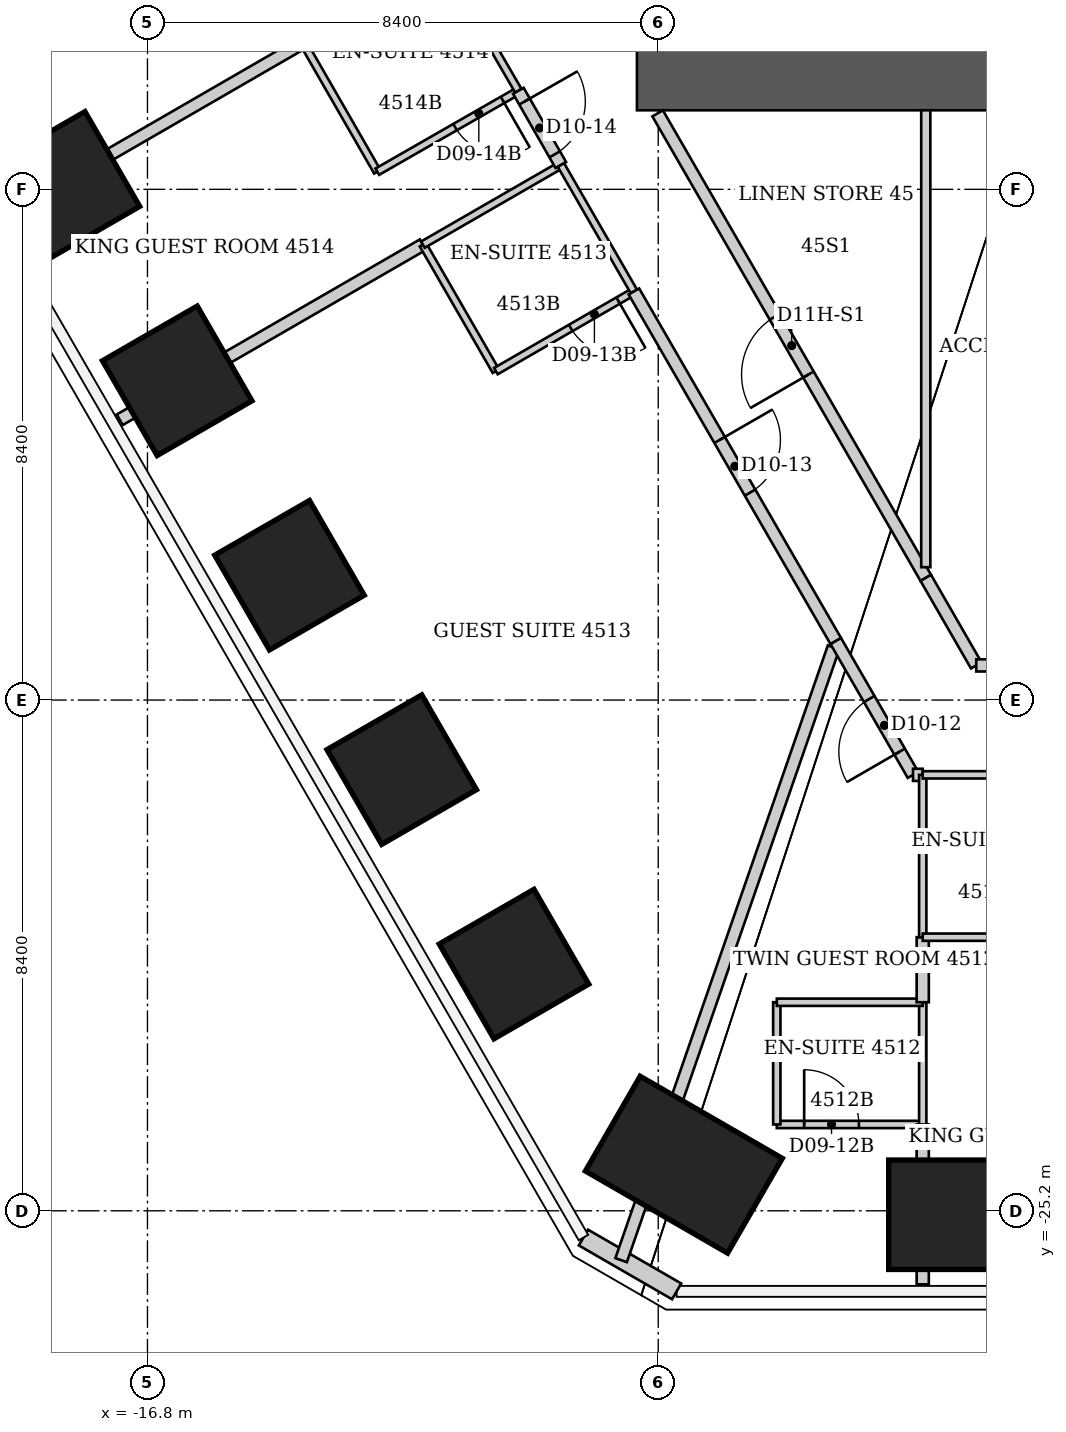
"""IFC4 building model, lengths in metres.
Left out: names, types, materials, properties, quantities, classifications, styles, units other than length and angle.
Written with IfcOpenShell. Run it as: python <this file> out.ifc"""

import sys

from ifc_helpers import new_model, si_unit, direction, frame, frame_2d, origin, origin_2d, place, context, subcontext, project, spatial, rectangle, extrude, element, fill, save


model = new_model("IFC4")
c1 = context("Model", 3, precision=1e-05, world=origin(), true_north=direction((0.0, 1.0)))
c2 = subcontext(c1, "Body", "Model", "MODEL_VIEW")
j1 = project(units=[si_unit("LENGTHUNIT", "METRE"), si_unit("PLANEANGLEUNIT", "RADIAN")], contexts=[c1])
p1 = place(None, origin())
s1 = spatial("IfcSite", under=j1, at=p1, CompositionType="ELEMENT")
p2 = place(p1, origin())
s2 = spatial("IfcBuilding", under=s1, at=p2, CompositionType="ELEMENT")
p3 = place(p2, frame((0.0, 0.0, 183.2)))
s3 = spatial("IfcBuildingStorey", under=s2, at=p3, CompositionType="ELEMENT", Elevation=183.2)
p4 = place(p3, frame((-3.71, -25.265, 0.0), z_axis=(0.0, 0.0, 1.0), x_axis=(0.0, -1.0, 0.0)))
e1 = element("IfcColumn", 1, at=p4, inside=s3, PredefinedType="COLUMN", context=c2, shape_type="SweptSolid", body=[
    extrude(rectangle(XDim=1.8, YDim=1.8, at=origin_2d()), origin(), (0.0, 0.0, 1.0), 3.8),
])
p5 = place(p3, frame((-7.979, -24.442, 0.0), z_axis=(0.0, 0.0, 1.0), x_axis=(-0.5, -0.866025403784, 0.0)))
e2 = element("IfcColumn", 2, at=p5, inside=s3, PredefinedType="COLUMN", context=c2, shape_type="SweptSolid", body=[
    extrude(rectangle(XDim=1.8, YDim=2.7, at=origin_2d()), origin(), (0.0, 0.0, 1.0), 3.8),
])
for number, where, z_axis, x_axis in (
    (3, (-10.772, -21.142, 0.0), (0.0, 0.0, 1.0), (-0.866, -0.5, 0.0)),
    (4, (-12.618, -17.945, 0.0), (0.0, 0.0, 1.0), (-0.866, -0.5, 0.0)),
    (5, (-14.465, -14.747, 0.0), (0.0, 0.0, 1.0), (-0.866, -0.5, 0.0)),
    (6, (-16.311, -11.549, 0.0), (0.0, 0.0, 1.0), (-0.866, -0.5, 0.0)),
    (7, (-18.157, -8.351, 0.0), (0.0, 0.0, 1.0), (-0.866, -0.5, 0.0)),
):
    element("IfcColumn", number, at=place(p3, frame(where, z_axis=z_axis, x_axis=x_axis)), inside=s3, PredefinedType="COLUMN", context=c2, shape_type="SweptSolid", body=[
        extrude(rectangle(XDim=1.8, YDim=1.8, at=origin_2d()), origin(), (0.0, 0.0, 1.0), 3.8),
    ])
p6 = place(p3, frame((-8.75, -6.6, 0.0), z_axis=(0.0, 0.0, 1.0), x_axis=(1.0, 0.0, 0.0)))
e8 = element("IfcWall", 8, at=p6, inside=s3, PredefinedType="SHEAR", context=c2, shape_type="SweptSolid", body=[
    extrude(rectangle(XDim=17.5, YDim=1.0, at=frame_2d((8.75, 0.0))), origin(), (0.0, 0.0, 1.0), 3.8),
])
p7 = place(p3, frame((-8.097, -26.525, 0.0), z_axis=(0.0, 0.0, 1.0), x_axis=(-0.866036293601, 0.499981137809, 0.0)))
e9 = element("IfcWall", 9, at=p7, inside=s3, PredefinedType="SOLIDWALL", context=c2, shape_type="SweptSolid", body=[
    extrude(rectangle(XDim=1.77, YDim=0.3, at=frame_2d((0.885, 0.0))), origin(), (0.0, 0.0, 1.0), 3.64),
])
p8 = place(p3, frame((-19.186, -8.85, 0.0), z_axis=(0.0, 0.0, 1.0), x_axis=(0.865702137343, 0.500559496364, 0.0)))
e10 = element("IfcWall", 10, at=p8, inside=s3, PredefinedType="PARTITIONING", context=c2, shape_type="SweptSolid", body=[
    extrude(rectangle(XDim=5.713, YDim=0.2, at=frame_2d((2.857, 0.0))), origin(), (0.0, 0.0, 1.0), 3.038),
])
p9 = place(p3, frame((-17.256, -12.19, 0.0), z_axis=(0.0, 0.0, 1.0), x_axis=(0.865937714159, 0.500151852138, 0.0)))
e11 = element("IfcWall", 11, at=p9, inside=s3, PredefinedType="PARTITIONING", context=c2, shape_type="SweptSolid", body=[
    extrude(rectangle(XDim=5.758, YDim=0.2, at=frame_2d((2.879, 0.0))), origin(), (0.0, 0.0, 1.0), 3.038),
])
p10 = place(p3, frame((-14.24, -5.99, 0.0), z_axis=(0.0, 0.0, 1.0), x_axis=(0.498748634132, -0.866746675766, 0.0)))
e12 = element("IfcWall", 12, at=p10, inside=s3, PredefinedType="PARTITIONING", context=c2, shape_type="SweptSolid", body=[
    extrude(rectangle(XDim=2.446, YDim=0.12, at=frame_2d((1.223, 0.0))), origin(), (0.0, 0.0, 1.0), 3.64),
])
p11 = place(p3, frame((-13.02, -8.11, 0.0), z_axis=(0.0, 0.0, 1.0), x_axis=(0.867545659855, 0.497357545501, 0.0)))
e13 = element("IfcWall", 13, at=p11, inside=s3, PredefinedType="PARTITIONING", context=c2, shape_type="SweptSolid", body=[
    extrude(rectangle(XDim=2.674, YDim=0.12, at=frame_2d((1.337, 0.0))), origin(), (0.0, 0.0, 1.0), 3.64),
])
p12 = place(p11, frame((1.474, 0.0, 0.0)))
e14 = element("IfcOpeningElement", 14, at=p12, cuts=e13, PredefinedType="OPENING", context=c2, shape_type="SweptSolid", body=[
    extrude(rectangle(XDim=0.9, YDim=2.03, at=frame_2d((0.45, 1.015))), frame((0.0, 0.06, 0.0), z_axis=(0.0, -1.0, 0.0), x_axis=(1.0, 0.0, 0.0)), (0.0, 0.0, 1.0), 0.12),
])
p13 = place(p3, frame((-12.27, -9.31, 0.0), z_axis=(0.0, 0.0, 1.0), x_axis=(0.499737123639, -0.866177122335, 0.0)))
e15 = element("IfcWall", 15, at=p13, inside=s3, PredefinedType="PARTITIONING", context=c2, shape_type="SweptSolid", body=[
    extrude(rectangle(XDim=2.401, YDim=0.12, at=frame_2d((1.201, 0.0))), origin(), (0.0, 0.0, 1.0), 3.64),
])
p14 = place(p3, frame((-12.27, -9.31, 0.0), z_axis=(0.0, 0.0, 1.0), x_axis=(0.866114241029, 0.499846097802, 0.0)))
e16 = element("IfcWall", 16, at=p14, inside=s3, PredefinedType="PARTITIONING", context=c2, shape_type="SweptSolid", body=[
    extrude(rectangle(XDim=2.621, YDim=0.12, at=frame_2d((1.311, 0.0))), origin(), (0.0, 0.0, 1.0), 3.038),
])
p15 = place(p3, frame((-11.93, -4.66, 0.0), z_axis=(0.0, 0.0, 1.0), x_axis=(0.501813488763, -0.864975850817, 0.0)))
e17 = element("IfcWall", 17, at=p15, inside=s3, PredefinedType="PARTITIONING", context=c2, shape_type="SweptSolid", body=[
    extrude(rectangle(XDim=2.451, YDim=0.12, at=frame_2d((1.226, 0.0))), origin(), (0.0, 0.0, 1.0), 3.64),
])
p16 = place(p3, frame((-11.07, -11.39, 0.0), z_axis=(0.0, 0.0, 1.0), x_axis=(0.866154567199, 0.49977621564, 0.0)))
e18 = element("IfcWall", 18, at=p16, inside=s3, PredefinedType="PARTITIONING", context=c2, shape_type="SweptSolid", body=[
    extrude(rectangle(XDim=2.621, YDim=0.12, at=frame_2d((1.311, 0.0))), origin(), (0.0, 0.0, 1.0), 3.64),
])
p17 = place(p16, frame((1.421, 0.0, 0.0)))
e19 = element("IfcOpeningElement", 19, at=p17, cuts=e18, PredefinedType="OPENING", context=c2, shape_type="SweptSolid", body=[
    extrude(rectangle(XDim=0.9, YDim=2.03, at=frame_2d((0.45, 1.015))), frame((0.0, 0.06, 0.0), z_axis=(0.0, -1.0, 0.0), x_axis=(1.0, 0.0, 0.0)), (0.0, 0.0, 1.0), 0.12),
])
p18 = place(p3, frame((-10.7, -6.78, 0.0), z_axis=(0.0, 0.0, 1.0), x_axis=(0.49643800013, -0.868072181346, 0.0)))
e20 = element("IfcWall", 20, at=p18, inside=s3, PredefinedType="PARTITIONING", context=c2, shape_type="SweptSolid", body=[
    extrude(rectangle(XDim=1.406, YDim=0.2, at=frame_2d((0.703, 0.0))), origin(), (0.0, 0.0, 1.0), 3.64),
])
p19 = place(p18, frame((0.203, 0.0, 0.0)))
e21 = element("IfcOpeningElement", 21, at=p19, cuts=e20, PredefinedType="OPENING", context=c2, shape_type="SweptSolid", body=[
    extrude(rectangle(XDim=1.0, YDim=2.13, at=frame_2d((0.5, 1.065))), frame((0.0, 0.1, 0.0), z_axis=(0.0, -1.0, 0.0), x_axis=(1.0, 0.0, 0.0)), (0.0, 0.0, 1.0), 0.2),
])
p20 = place(p3, frame((-10.0, -8.0, 0.0), z_axis=(0.0, 0.0, 1.0), x_axis=(0.499693115345, -0.866202511239, 0.0)))
e22 = element("IfcWall", 22, at=p20, inside=s3, PredefinedType="PARTITIONING", context=c2, shape_type="SweptSolid", body=[
    extrude(rectangle(XDim=2.401, YDim=0.12, at=frame_2d((1.201, 0.0))), origin(), (0.0, 0.0, 1.0), 3.64),
])
p21 = place(p3, frame((-9.01, -26.012, 0.0), z_axis=(0.0, 0.0, 1.0), x_axis=(0.327582991606, 0.944822408504, 0.0)))
e23 = element("IfcWall", 23, at=p21, inside=s3, PredefinedType="PARTITIONING", context=c2, shape_type="SweptSolid", body=[
    extrude(rectangle(XDim=10.667, YDim=0.2, at=frame_2d((5.333, 0.0))), origin(), (0.0, 0.0, 1.0), 3.64),
])
p22 = place(p3, frame((-8.8, -10.08, 0.0), z_axis=(0.0, 0.0, 1.0), x_axis=(0.500034373799, -0.866005557153, 0.0)))
e24 = element("IfcWall", 24, at=p22, inside=s3, PredefinedType="PARTITIONING", context=c2, shape_type="SweptSolid", body=[
    extrude(rectangle(XDim=6.64, YDim=0.2, at=frame_2d((3.32, 0.0))), origin(), (0.0, 0.0, 1.0), 3.64),
])
p23 = place(p22, frame((2.82, 0.0, 0.0)))
e25 = element("IfcOpeningElement", 25, at=p23, cuts=e24, PredefinedType="OPENING", context=c2, shape_type="SweptSolid", body=[
    extrude(rectangle(XDim=1.0, YDim=2.13, at=frame_2d((0.5, 1.065))), frame((0.0, 0.1, 0.0), z_axis=(0.0, -1.0, 0.0), x_axis=(1.0, 0.0, 0.0)), (0.0, 0.0, 1.0), 0.2),
])
p24 = place(p3, frame((-6.45, -23.78, 0.0), z_axis=(0.0, 0.0, 1.0), x_axis=(1.0, 0.0, 0.0)))
e26 = element("IfcWall", 26, at=p24, inside=s3, PredefinedType="PARTITIONING", context=c2, shape_type="SweptSolid", body=[
    extrude(rectangle(XDim=2.4, YDim=0.12, at=frame_2d((1.2, 0.0))), origin(), (0.0, 0.0, 1.0), 3.64),
])
p25 = place(p24, frame((0.45, 0.0, 0.0)))
e27 = element("IfcOpeningElement", 27, at=p25, cuts=e26, PredefinedType="OPENING", context=c2, shape_type="SweptSolid", body=[
    extrude(rectangle(XDim=0.9, YDim=2.03, at=frame_2d((0.45, 1.015))), frame((0.0, 0.06, 0.0), z_axis=(0.0, -1.0, 0.0), x_axis=(1.0, 0.0, 0.0)), (0.0, 0.0, 1.0), 0.12),
])
p26 = place(p3, frame((-6.45, -21.77, 0.0), z_axis=(0.0, 0.0, 1.0), x_axis=(0.0, -1.0, 0.0)))
e28 = element("IfcWall", 28, at=p26, inside=s3, PredefinedType="PARTITIONING", context=c2, shape_type="SweptSolid", body=[
    extrude(rectangle(XDim=2.01, YDim=0.12, at=frame_2d((1.005, 0.0))), origin(), (0.0, 0.0, 1.0), 3.64),
])
p27 = place(p3, frame((-5.48, -15.83, 0.0), z_axis=(0.0, 0.0, 1.0), x_axis=(0.499963722229, -0.866046347752, 0.0)))
e29 = element("IfcWall", 29, at=p27, inside=s3, PredefinedType="PARTITIONING", context=c2, shape_type="SweptSolid", body=[
    extrude(rectangle(XDim=2.54, YDim=0.2, at=frame_2d((1.27, 0.0))), origin(), (0.0, 0.0, 1.0), 3.64),
])
p28 = place(p27, frame((1.1, 0.0, 0.0)))
e30 = element("IfcOpeningElement", 30, at=p28, cuts=e29, PredefinedType="OPENING", context=c2, shape_type="SweptSolid", body=[
    extrude(rectangle(XDim=1.0, YDim=2.13, at=frame_2d((0.5, 1.065))), frame((0.0, 0.1, 0.0), z_axis=(0.0, -1.0, 0.0), x_axis=(1.0, 0.0, 0.0)), (0.0, 0.0, 1.0), 0.2),
])
p29 = place(p3, frame((-4.21, -18.03, 0.0), z_axis=(0.0, 0.0, 1.0), x_axis=(1.0, 0.0, 0.0)))
e31 = element("IfcWall", 31, at=p29, inside=s3, PredefinedType="PARTITIONING", context=c2, shape_type="SweptSolid", body=[
    extrude(rectangle(XDim=0.16, YDim=0.2, at=frame_2d((0.08, 0.0))), origin(), (0.0, 0.0, 1.0), 3.64),
])
p30 = place(p3, frame((-4.05, -26.41, 0.0), z_axis=(0.0, 0.0, 1.0), x_axis=(0.0, 1.0, 0.0)))
e32 = element("IfcWall", 32, at=p30, inside=s3, PredefinedType="PARTITIONING", context=c2, shape_type="SweptSolid", body=[
    extrude(rectangle(XDim=2.63, YDim=0.2, at=frame_2d((1.315, 0.0))), origin(), (0.0, 0.0, 1.0), 3.64),
])
p31 = place(p3, frame((-4.05, -23.78, 0.0), z_axis=(0.0, 0.0, 1.0), x_axis=(0.0, 1.0, 0.0)))
e33 = element("IfcWall", 33, at=p31, inside=s3, PredefinedType="PARTITIONING", context=c2, shape_type="SweptSolid", body=[
    extrude(rectangle(XDim=2.01, YDim=0.12, at=frame_2d((1.005, 0.0))), origin(), (0.0, 0.0, 1.0), 3.64),
])
p32 = place(p3, frame((-4.05, -21.77, 0.0), z_axis=(0.0, 0.0, 1.0), x_axis=(-1.0, 0.0, 0.0)))
e34 = element("IfcWall", 34, at=p32, inside=s3, PredefinedType="PARTITIONING", context=c2, shape_type="SweptSolid", body=[
    extrude(rectangle(XDim=2.4, YDim=0.12, at=frame_2d((1.2, 0.0))), origin(), (0.0, 0.0, 1.0), 3.64),
])
p33 = place(p3, frame((-4.05, -21.77, 0.0), z_axis=(0.0, 0.0, 1.0), x_axis=(0.0, 1.0, 0.0)))
e35 = element("IfcWall", 35, at=p33, inside=s3, PredefinedType="PARTITIONING", context=c2, shape_type="SweptSolid", body=[
    extrude(rectangle(XDim=1.07, YDim=0.2, at=frame_2d((0.535, 0.0))), origin(), (0.0, 0.0, 1.0), 3.64),
])
p34 = place(p3, frame((-4.05, -20.7, 0.0), z_axis=(0.0, 0.0, 1.0), x_axis=(0.0, 1.0, 0.0)))
e36 = element("IfcWall", 36, at=p34, inside=s3, PredefinedType="PARTITIONING", context=c2, shape_type="SweptSolid", body=[
    extrude(rectangle(XDim=2.67, YDim=0.12, at=frame_2d((1.335, 0.0))), origin(), (0.0, 0.0, 1.0), 3.64),
])
for number, where, z_axis, x_axis in (
    (37, (-4.05, -20.7, 0.0), (0.0, 0.0, 1.0), (1.0, 0.0, 0.0)),
    (38, (-4.05, -18.03, 0.0), (0.0, 0.0, 1.0), (1.0, 0.0, 0.0)),
):
    element("IfcWall", number, at=place(p3, frame(where, z_axis=z_axis, x_axis=x_axis)), inside=s3, PredefinedType="PARTITIONING", context=c2, shape_type="SweptSolid", body=[
        extrude(rectangle(XDim=2.45, YDim=0.12, at=frame_2d((1.225, 0.0))), origin(), (0.0, 0.0, 1.0), 3.64),
    ])
p35 = place(p3, frame((-4.0, -14.79, 0.0), z_axis=(0.0, 0.0, 1.0), x_axis=(-0.499916512745, 0.866073599808, 0.0)))
e39 = element("IfcWall", 39, at=p35, inside=s3, PredefinedType="PARTITIONING", context=c2, shape_type="SweptSolid", body=[
    extrude(rectangle(XDim=8.821, YDim=0.2, at=frame_2d((4.411, 0.0))), origin(), (0.0, 0.0, 1.0), 3.64),
])
p36 = place(p35, frame((3.861, 0.0, 0.0)))
e40 = element("IfcOpeningElement", 40, at=p36, cuts=e39, PredefinedType="OPENING", context=c2, shape_type="SweptSolid", body=[
    extrude(rectangle(XDim=1.1, YDim=2.2, at=frame_2d((0.55, 1.1))), frame((0.0, 0.1, 0.0), z_axis=(0.0, -1.0, 0.0), x_axis=(1.0, 0.0, 0.0)), (0.0, 0.0, 1.0), 0.2),
])
p37 = place(p3, frame((-4.0, -7.1, 0.0), z_axis=(0.0, 0.0, 1.0), x_axis=(0.0, -1.0, 0.0)))
e41 = element("IfcWall", 41, at=p37, inside=s3, PredefinedType="PARTITIONING", context=c2, shape_type="SweptSolid", body=[
    extrude(rectangle(XDim=7.515, YDim=0.15, at=frame_2d((3.757, 0.0))), origin(), (0.0, 0.0, 1.0), 3.64),
])
p38 = place(p3, frame((-3.17, -16.23, 0.0), z_axis=(0.0, 0.0, 1.0), x_axis=(-0.499425709803, 0.866356716594, 0.0)))
e42 = element("IfcWall", 42, at=p38, inside=s3, PredefinedType="PARTITIONING", context=c2, shape_type="SweptSolid", body=[
    extrude(rectangle(XDim=1.662, YDim=0.2, at=frame_2d((0.831, 0.0))), origin(), (0.0, 0.0, 1.0), 3.64),
])
p39 = place(p3, frame((-1.2, -16.23, 0.0), z_axis=(0.0, 0.0, 1.0), x_axis=(-1.0, 0.0, 0.0)))
e43 = element("IfcWall", 43, at=p39, inside=s3, PredefinedType="PARTITIONING", context=c2, shape_type="SweptSolid", body=[
    extrude(rectangle(XDim=1.97, YDim=0.2, at=frame_2d((0.985, 0.0))), origin(), (0.0, 0.0, 1.0), 3.64),
])
p40 = place(p39, frame((0.435, 0.0, 0.0)))
e44 = element("IfcOpeningElement", 44, at=p40, cuts=e43, PredefinedType="OPENING", context=c2, shape_type="SweptSolid", body=[
    extrude(rectangle(XDim=1.1, YDim=2.2, at=frame_2d((0.55, 1.1))), frame((0.0, 0.1, 0.0), z_axis=(0.0, -1.0, 0.0), x_axis=(1.0, 0.0, 0.0)), (0.0, 0.0, 1.0), 0.2),
])
p41 = place(p28, origin())
e45 = element("IfcDoor", 45, at=p41, inside=s3, OperationType="SINGLE_SWING_RIGHT", PredefinedType="DOOR", context=c2, shape_type="SweptSolid", body=[
    extrude(rectangle(XDim=1.0, YDim=2.13, at=frame_2d((0.5, 1.065))), frame((0.0, 0.025, 0.0), z_axis=(0.0, -1.0, 0.0), x_axis=(1.0, 0.0, 0.0)), (0.0, 0.0, 1.0), 0.05),
])
fill(e30, e45)
p42 = place(p25, origin())
e46 = element("IfcDoor", 46, at=p42, inside=s3, OperationType="SINGLE_SWING_LEFT", PredefinedType="DOOR", context=c2, shape_type="SweptSolid", body=[
    extrude(rectangle(XDim=0.9, YDim=2.03, at=frame_2d((0.45, 1.015))), frame((0.0, 0.025, 0.0), z_axis=(0.0, -1.0, 0.0), x_axis=(1.0, 0.0, 0.0)), (0.0, 0.0, 1.0), 0.05),
])
fill(e27, e46)
p43 = place(p23, origin())
e47 = element("IfcDoor", 47, at=p43, inside=s3, OperationType="SINGLE_SWING_LEFT", PredefinedType="DOOR", context=c2, shape_type="SweptSolid", body=[
    extrude(rectangle(XDim=1.0, YDim=2.13, at=frame_2d((0.5, 1.065))), frame((0.0, 0.025, 0.0), z_axis=(0.0, -1.0, 0.0), x_axis=(1.0, 0.0, 0.0)), (0.0, 0.0, 1.0), 0.05),
])
fill(e25, e47)
p44 = place(p17, origin())
e48 = element("IfcDoor", 48, at=p44, inside=s3, OperationType="SINGLE_SWING_RIGHT", PredefinedType="DOOR", context=c2, shape_type="SweptSolid", body=[
    extrude(rectangle(XDim=0.9, YDim=2.03, at=frame_2d((0.45, 1.015))), frame((0.0, 0.025, 0.0), z_axis=(0.0, -1.0, 0.0), x_axis=(1.0, 0.0, 0.0)), (0.0, 0.0, 1.0), 0.05),
])
fill(e19, e48)
p45 = place(p19, origin())
e49 = element("IfcDoor", 49, at=p45, inside=s3, OperationType="SINGLE_SWING_LEFT", PredefinedType="DOOR", context=c2, shape_type="SweptSolid", body=[
    extrude(rectangle(XDim=1.0, YDim=2.13, at=frame_2d((0.5, 1.065))), frame((0.0, 0.025, 0.0), z_axis=(0.0, -1.0, 0.0), x_axis=(1.0, 0.0, 0.0)), (0.0, 0.0, 1.0), 0.05),
])
fill(e21, e49)
p46 = place(p12, origin())
e50 = element("IfcDoor", 50, at=p46, inside=s3, OperationType="SINGLE_SWING_RIGHT", PredefinedType="DOOR", context=c2, shape_type="SweptSolid", body=[
    extrude(rectangle(XDim=0.9, YDim=2.03, at=frame_2d((0.45, 1.015))), frame((0.0, 0.025, 0.0), z_axis=(0.0, -1.0, 0.0), x_axis=(1.0, 0.0, 0.0)), (0.0, 0.0, 1.0), 0.05),
])
fill(e14, e50)
p47 = place(p36, origin())
e51 = element("IfcDoor", 51, at=p47, inside=s3, OperationType="SINGLE_SWING_LEFT", PredefinedType="DOOR", context=c2, shape_type="SweptSolid", body=[
    extrude(rectangle(XDim=1.1, YDim=2.2, at=frame_2d((0.55, 1.1))), frame((0.0, 0.025, 0.0), z_axis=(0.0, -1.0, 0.0), x_axis=(1.0, 0.0, 0.0)), (0.0, 0.0, 1.0), 0.05),
])
fill(e40, e51)
save(model, sys.argv[1])
